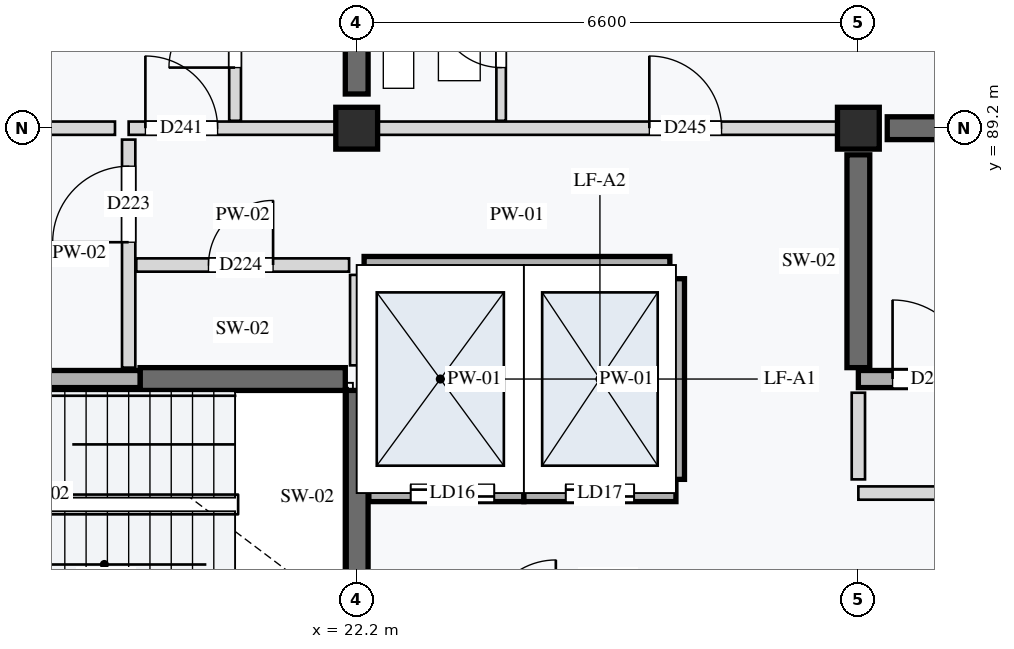
"""IFC4 building model, lengths in metres.
Left out: names, types, materials, properties, quantities, classifications, styles, units other than length and angle.
Written with IfcOpenShell. Run it as: python <this file> out.ifc"""

import sys

from ifc_helpers import new_model, si_unit, direction, frame, frame_2d, origin, origin_2d, place, context, subcontext, project, spatial, rectangle, extrude, element, fill, save


model = new_model("IFC4")
c1 = context("Model", 3, precision=1e-05, world=origin(), true_north=direction((0.0, 1.0)))
c2 = subcontext(c1, "Body", "Model", "MODEL_VIEW")
j1 = project(units=[si_unit("LENGTHUNIT", "METRE"), si_unit("PLANEANGLEUNIT", "RADIAN")], contexts=[c1])
p1 = place(None, origin())
s1 = spatial("IfcSite", under=j1, at=p1, CompositionType="ELEMENT")
p2 = place(p1, origin())
s2 = spatial("IfcBuilding", under=s1, at=p2, CompositionType="ELEMENT")
p3 = place(p2, frame((0.0, 0.0, 24.4)))
s3 = spatial("IfcBuildingStorey", under=s2, at=p3, CompositionType="ELEMENT", Elevation=24.4)
for number, where, z_axis, x_axis in (
    (1, (22.2, 89.2, 0.0), (0.0, 0.0, 1.0), (1.0, 0.0, 0.0)),
    (2, (28.8, 89.2, 0.0), (0.0, 0.0, 1.0), (1.0, 0.0, 0.0)),
):
    element("IfcColumn", number, at=place(p3, frame(where, z_axis=z_axis, x_axis=x_axis)), inside=s3, PredefinedType="COLUMN", context=c2, shape_type="SweptSolid", body=[
        extrude(rectangle(XDim=0.55, YDim=0.55, at=origin_2d()), origin(), (0.0, 0.0, 1.0), 3.2),
    ])
p4 = place(p3, frame((19.35, 85.9, 0.0), z_axis=(0.0, 0.0, 1.0), x_axis=(1.0, 0.0, 0.0)))
e3 = element("IfcWall", 3, at=p4, inside=s3, PredefinedType="SHEAR", context=c2, shape_type="SweptSolid", body=[
    extrude(rectangle(XDim=2.7, YDim=0.3, at=frame_2d((1.35, 0.0))), origin(), (0.0, 0.0, 1.0), 2.97),
])
p5 = place(p3, frame((22.2, 82.95, 0.0), z_axis=(0.0, 0.0, 1.0), x_axis=(0.0, 1.0, 0.0)))
e4 = element("IfcWall", 4, at=p5, inside=s3, PredefinedType="SHEAR", context=c2, shape_type="SweptSolid", body=[
    extrude(rectangle(XDim=2.8, YDim=0.3, at=frame_2d((1.4, 0.0))), origin(), (0.0, 0.0, 1.0), 2.97),
])
p6 = place(p3, frame((29.18, 89.2, 0.0), z_axis=(0.0, 0.0, 1.0), x_axis=(1.0, 0.0, 0.0)))
e5 = element("IfcWall", 5, at=p6, inside=s3, PredefinedType="SHEAR", context=c2, shape_type="SweptSolid", body=[
    extrude(rectangle(XDim=5.84, YDim=0.3, at=frame_2d((2.92, 0.0))), origin(), (0.0, 0.0, 1.0), 2.97),
])
p7 = place(p3, frame((28.8, 86.05, 0.0), z_axis=(0.0, 0.0, 1.0), x_axis=(0.0, 1.0, 0.0)))
e6 = element("IfcWall", 6, at=p7, inside=s3, PredefinedType="SHEAR", context=c2, shape_type="SweptSolid", body=[
    extrude(rectangle(XDim=2.8, YDim=0.3, at=frame_2d((1.4, 0.0))), origin(), (0.0, 0.0, 1.0), 2.97),
])
p8 = place(p3, frame((22.2, 89.65, 0.0), z_axis=(0.0, 0.0, 1.0), x_axis=(0.0, 1.0, 0.0)))
e7 = element("IfcWall", 7, at=p8, inside=s3, PredefinedType="SHEAR", context=c2, shape_type="SweptSolid", body=[
    extrude(rectangle(XDim=5.7, YDim=0.3, at=frame_2d((2.85, 0.0))), origin(), (0.0, 0.0, 1.0), 2.97),
])
p9 = place(p3, frame((15.75, 85.9, 0.0), z_axis=(0.0, 0.0, 1.0), x_axis=(1.0, 0.0, 0.0)))
e8 = element("IfcWall", 8, at=p9, inside=s3, PredefinedType="STANDARD", context=c2, shape_type="SweptSolid", body=[
    extrude(rectangle(XDim=3.6, YDim=0.225, at=frame_2d((1.8, 0.0))), origin(), (0.0, 0.0, 1.0), 2.97),
])
p10 = place(p9, frame((0.45, 0.0, 0.0)))
e9 = element("IfcOpeningElement", 9, at=p10, cuts=e8, PredefinedType="OPENING", context=c2, shape_type="SweptSolid", body=[
    extrude(rectangle(XDim=1.0, YDim=2.1, at=frame_2d((0.5, 1.05))), frame((0.0, 0.123, 0.0), z_axis=(0.0, -1.0, 0.0), x_axis=(1.0, 0.0, 0.0)), (0.0, 0.0, 1.0), 0.245),
])
p11 = place(p3, frame((19.2, 86.05, 0.0), z_axis=(0.0, 0.0, 1.0), x_axis=(0.0, 1.0, 0.0)))
e10 = element("IfcWall", 10, at=p11, inside=s3, PredefinedType="PARTITIONING", context=c2, shape_type="SweptSolid", body=[
    extrude(rectangle(XDim=3.0, YDim=0.175, at=frame_2d((1.5, 0.0))), origin(), (0.0, 0.0, 1.0), 2.97),
])
p12 = place(p11, frame((1.65, 0.0, 0.0)))
e11 = element("IfcOpeningElement", 11, at=p12, cuts=e10, PredefinedType="OPENING", context=c2, shape_type="SweptSolid", body=[
    extrude(rectangle(XDim=1.0, YDim=2.16, at=frame_2d((0.5, 1.08))), frame((0.0, 0.097, 0.0), z_axis=(0.0, -1.0, 0.0), x_axis=(1.0, 0.0, 0.0)), (0.0, 0.0, 1.0), 0.195),
])
p13 = place(p3, frame((19.3, 87.4, 0.0), z_axis=(0.0, 0.0, 1.0), x_axis=(1.0, 0.0, 0.0)))
e12 = element("IfcWall", 12, at=p13, inside=s3, PredefinedType="PARTITIONING", context=c2, shape_type="SweptSolid", body=[
    extrude(rectangle(XDim=2.8, YDim=0.175, at=frame_2d((1.4, 0.0))), origin(), (0.0, 0.0, 1.0), 2.97),
])
p14 = place(p13, frame((0.95, 0.0, 0.0)))
e13 = element("IfcOpeningElement", 13, at=p14, cuts=e12, PredefinedType="OPENING", context=c2, shape_type="SweptSolid", body=[
    extrude(rectangle(XDim=0.85, YDim=2.0, at=frame_2d((0.425, 1.0))), frame((0.0, 0.097, 0.0), z_axis=(0.0, -1.0, 0.0), x_axis=(1.0, 0.0, 0.0)), (0.0, 0.0, 1.0), 0.195),
])
p15 = place(p3, frame((22.2, 86.08, 0.0), z_axis=(0.0, 0.0, 1.0), x_axis=(0.0, 1.0, 0.0)))
e14 = element("IfcWall", 14, at=p15, inside=s3, PredefinedType="PARTITIONING", context=c2, shape_type="SweptSolid", body=[
    extrude(rectangle(XDim=1.19, YDim=0.175, at=frame_2d((0.595, 0.0))), origin(), (0.0, 0.0, 1.0), 2.97),
])
p16 = place(p3, frame((22.36, 84.4, 0.0), z_axis=(0.0, 0.0, 1.0), x_axis=(1.0, 0.0, 0.0)))
e15 = element("IfcWall", 15, at=p16, inside=s3, PredefinedType="STANDARD", context=c2, shape_type="SweptSolid", body=[
    extrude(rectangle(XDim=2.04, YDim=0.225, at=frame_2d((1.02, 0.0))), origin(), (0.0, 0.0, 1.0), 2.97),
])
p17 = place(p16, frame((0.55, 0.0, 0.0)))
e16 = element("IfcOpeningElement", 16, at=p17, cuts=e15, PredefinedType="OPENING", context=c2, shape_type="SweptSolid", body=[
    extrude(rectangle(XDim=1.1, YDim=2.1, at=frame_2d((0.55, 1.05))), frame((0.0, 0.123, 0.0), z_axis=(0.0, -1.0, 0.0), x_axis=(1.0, 0.0, 0.0)), (0.0, 0.0, 1.0), 0.245),
])
p18 = place(p3, frame((24.4, 84.4, 0.0), z_axis=(0.0, 0.0, 1.0), x_axis=(1.0, 0.0, 0.0)))
e17 = element("IfcWall", 17, at=p18, inside=s3, PredefinedType="STANDARD", context=c2, shape_type="SweptSolid", body=[
    extrude(rectangle(XDim=2.0, YDim=0.225, at=frame_2d((1.0, 0.0))), origin(), (0.0, 0.0, 1.0), 2.97),
])
p19 = place(p18, frame((0.55, 0.0, 0.0)))
e18 = element("IfcOpeningElement", 18, at=p19, cuts=e17, PredefinedType="OPENING", context=c2, shape_type="SweptSolid", body=[
    extrude(rectangle(XDim=0.9, YDim=2.1, at=frame_2d((0.45, 1.05))), frame((0.0, 0.123, 0.0), z_axis=(0.0, -1.0, 0.0), x_axis=(1.0, 0.0, 0.0)), (0.0, 0.0, 1.0), 0.245),
])
p20 = place(p3, frame((22.298, 87.4, 0.0), z_axis=(0.0, 0.0, 1.0), x_axis=(1.0, 0.0, 0.0)))
e19 = element("IfcWall", 19, at=p20, inside=s3, PredefinedType="STANDARD", context=c2, shape_type="SweptSolid", body=[
    extrude(rectangle(XDim=4.022, YDim=0.225, at=frame_2d((2.011, 0.0))), origin(), (0.0, 0.0, 1.0), 2.97),
])
for number, where, z_axis, x_axis in (
    (20, (24.4, 84.58, 0.0), (0.0, 0.0, 1.0), (0.0, 1.0, 0.0)),
    (21, (26.4, 84.58, 0.0), (0.0, 0.0, 1.0), (0.0, 1.0, 0.0)),
):
    element("IfcWall", number, at=place(p3, frame(where, z_axis=z_axis, x_axis=x_axis)), inside=s3, PredefinedType="STANDARD", context=c2, shape_type="SweptSolid", body=[
        extrude(rectangle(XDim=2.64, YDim=0.225, at=frame_2d((1.32, 0.0))), origin(), (0.0, 0.0, 1.0), 2.97),
    ])
p21 = place(p3, frame((28.8, 85.9, 0.0), z_axis=(0.0, 0.0, 1.0), x_axis=(1.0, 0.0, 0.0)))
e22 = element("IfcWall", 22, at=p21, inside=s3, PredefinedType="STANDARD", context=c2, shape_type="SweptSolid", body=[
    extrude(rectangle(XDim=3.45, YDim=0.225, at=frame_2d((1.725, 0.0))), origin(), (0.0, 0.0, 1.0), 2.97),
])
p22 = place(p21, frame((0.45, 0.0, 0.0)))
e23 = element("IfcOpeningElement", 23, at=p22, cuts=e22, PredefinedType="OPENING", context=c2, shape_type="SweptSolid", body=[
    extrude(rectangle(XDim=1.04, YDim=2.12, at=frame_2d((0.52, 1.06))), frame((0.0, 0.123, 0.0), z_axis=(0.0, -1.0, 0.0), x_axis=(1.0, 0.0, 0.0)), (0.0, 0.0, 1.0), 0.245),
])
p23 = place(p3, frame((28.8, 84.4, 0.0), z_axis=(0.0, 0.0, 1.0), x_axis=(1.0, 0.0, 0.0)))
e24 = element("IfcWall", 24, at=p23, inside=s3, PredefinedType="PARTITIONING", context=c2, shape_type="SweptSolid", body=[
    extrude(rectangle(XDim=3.3, YDim=0.175, at=frame_2d((1.65, 0.0))), origin(), (0.0, 0.0, 1.0), 2.97),
])
p24 = place(p23, frame((1.8, 0.0, 0.0)))
e25 = element("IfcOpeningElement", 25, at=p24, cuts=e24, PredefinedType="OPENING", context=c2, shape_type="SweptSolid", body=[
    extrude(rectangle(XDim=1.0, YDim=2.1, at=frame_2d((0.5, 1.05))), frame((0.0, 0.097, 0.0), z_axis=(0.0, -1.0, 0.0), x_axis=(1.0, 0.0, 0.0)), (0.0, 0.0, 1.0), 0.195),
])
p25 = place(p3, frame((28.8, 84.58, 0.0), z_axis=(0.0, 0.0, 1.0), x_axis=(0.0, 1.0, 0.0)))
e26 = element("IfcWall", 26, at=p25, inside=s3, PredefinedType="PARTITIONING", context=c2, shape_type="SweptSolid", body=[
    extrude(rectangle(XDim=1.14, YDim=0.175, at=frame_2d((0.57, 0.0))), origin(), (0.0, 0.0, 1.0), 2.97),
])
p26 = place(p3, frame((15.88, 89.2, 0.0), z_axis=(0.0, 0.0, 1.0), x_axis=(1.0, 0.0, 0.0)))
e27 = element("IfcWall", 27, at=p26, inside=s3, PredefinedType="PARTITIONING", context=c2, shape_type="SweptSolid", body=[
    extrude(rectangle(XDim=3.14, YDim=0.175, at=frame_2d((1.57, 0.0))), origin(), (0.0, 0.0, 1.0), 2.7),
])
p27 = place(p3, frame((19.2, 89.2, 0.0), z_axis=(0.0, 0.0, 1.0), x_axis=(1.0, 0.0, 0.0)))
e28 = element("IfcWall", 28, at=p27, inside=s3, PredefinedType="PARTITIONING", context=c2, shape_type="SweptSolid", body=[
    extrude(rectangle(XDim=3.0, YDim=0.175, at=frame_2d((1.5, 0.0))), origin(), (0.0, 0.0, 1.0), 2.7),
])
p28 = place(p27, frame((0.22, 0.0, 0.0)))
e29 = element("IfcOpeningElement", 29, at=p28, cuts=e28, PredefinedType="OPENING", context=c2, shape_type="SweptSolid", body=[
    extrude(rectangle(XDim=0.95, YDim=2.16, at=frame_2d((0.475, 1.08))), frame((0.0, 0.097, 0.0), z_axis=(0.0, -1.0, 0.0), x_axis=(1.0, 0.0, 0.0)), (0.0, 0.0, 1.0), 0.195),
])
p29 = place(p3, frame((20.6, 89.298, 0.0), z_axis=(0.0, 0.0, 1.0), x_axis=(0.0, 1.0, 0.0)))
e30 = element("IfcWall", 30, at=p29, inside=s3, PredefinedType="PARTITIONING", context=c2, shape_type="SweptSolid", body=[
    extrude(rectangle(XDim=2.302, YDim=0.155, at=frame_2d((1.151, 0.0))), origin(), (0.0, 0.0, 1.0), 2.97),
])
p30 = place(p29, frame((0.7, 0.0, 0.0)))
e31 = element("IfcOpeningElement", 31, at=p30, cuts=e30, PredefinedType="OPENING", context=c2, shape_type="SweptSolid", body=[
    extrude(rectangle(XDim=0.87, YDim=2.08, at=frame_2d((0.435, 1.04))), frame((0.0, 0.087, 0.0), z_axis=(0.0, -1.0, 0.0), x_axis=(1.0, 0.0, 0.0)), (0.0, 0.0, 1.0), 0.175),
])
p31 = place(p3, frame((22.2, 89.2, 0.0), z_axis=(0.0, 0.0, 1.0), x_axis=(1.0, 0.0, 0.0)))
e32 = element("IfcWall", 32, at=p31, inside=s3, PredefinedType="PARTITIONING", context=c2, shape_type="SweptSolid", body=[
    extrude(rectangle(XDim=6.6, YDim=0.175, at=frame_2d((3.3, 0.0))), origin(), (0.0, 0.0, 1.0), 2.7),
])
p32 = place(p31, frame((3.85, 0.0, 0.0)))
e33 = element("IfcOpeningElement", 33, at=p32, cuts=e32, PredefinedType="OPENING", context=c2, shape_type="SweptSolid", body=[
    extrude(rectangle(XDim=0.95, YDim=2.16, at=frame_2d((0.475, 1.08))), frame((0.0, 0.097, 0.0), z_axis=(0.0, -1.0, 0.0), x_axis=(1.0, 0.0, 0.0)), (0.0, 0.0, 1.0), 0.195),
])
p33 = place(p3, frame((24.1, 89.298, 0.0), z_axis=(0.0, 0.0, 1.0), x_axis=(0.0, 1.0, 0.0)))
e34 = element("IfcWall", 34, at=p33, inside=s3, PredefinedType="PARTITIONING", context=c2, shape_type="SweptSolid", body=[
    extrude(rectangle(XDim=2.302, YDim=0.125, at=frame_2d((1.151, 0.0))), origin(), (0.0, 0.0, 1.0), 2.97),
])
p34 = place(p33, frame((0.7, 0.0, 0.0)))
e35 = element("IfcOpeningElement", 35, at=p34, cuts=e34, PredefinedType="OPENING", context=c2, shape_type="SweptSolid", body=[
    extrude(rectangle(XDim=0.84, YDim=2.06, at=frame_2d((0.42, 1.03))), frame((0.0, 0.073, 0.0), z_axis=(0.0, -1.0, 0.0), x_axis=(1.0, 0.0, 0.0)), (0.0, 0.0, 1.0), 0.145),
])
p35 = place(p12, origin())
e36 = element("IfcDoor", 36, at=p35, inside=s3, OperationType="SINGLE_SWING_LEFT", PredefinedType="DOOR", context=c2, shape_type="SweptSolid", body=[
    extrude(rectangle(XDim=1.0, YDim=2.16, at=frame_2d((0.5, 1.08))), frame((0.0, 0.025, 0.0), z_axis=(0.0, -1.0, 0.0), x_axis=(1.0, 0.0, 0.0)), (0.0, 0.0, 1.0), 0.05),
])
fill(e11, e36)
p36 = place(p14, origin())
e37 = element("IfcDoor", 37, at=p36, inside=s3, OperationType="SINGLE_SWING_RIGHT", PredefinedType="DOOR", context=c2, shape_type="SweptSolid", body=[
    extrude(rectangle(XDim=0.85, YDim=2.0, at=frame_2d((0.425, 1.0))), frame((0.0, 0.025, 0.0), z_axis=(0.0, -1.0, 0.0), x_axis=(1.0, 0.0, 0.0)), (0.0, 0.0, 1.0), 0.05),
])
fill(e13, e37)
p37 = place(p17, origin())
e38 = element("IfcDoor", 38, at=p37, inside=s3, OperationType="DOUBLE_DOOR_SLIDING", PredefinedType="DOOR", context=c2, shape_type="SweptSolid", body=[
    extrude(rectangle(XDim=1.1, YDim=2.1, at=frame_2d((0.55, 1.05))), frame((0.0, 0.025, 0.0), z_axis=(0.0, -1.0, 0.0), x_axis=(1.0, 0.0, 0.0)), (0.0, 0.0, 1.0), 0.05),
])
fill(e16, e38)
p38 = place(p19, origin())
e39 = element("IfcDoor", 39, at=p38, inside=s3, OperationType="DOUBLE_DOOR_SLIDING", PredefinedType="DOOR", context=c2, shape_type="SweptSolid", body=[
    extrude(rectangle(XDim=0.9, YDim=2.1, at=frame_2d((0.45, 1.05))), frame((0.0, 0.025, 0.0), z_axis=(0.0, -1.0, 0.0), x_axis=(1.0, 0.0, 0.0)), (0.0, 0.0, 1.0), 0.05),
])
fill(e18, e39)
p39 = place(p22, origin())
e40 = element("IfcDoor", 40, at=p39, inside=s3, OperationType="SINGLE_SWING_LEFT", PredefinedType="DOOR", context=c2, shape_type="SweptSolid", body=[
    extrude(rectangle(XDim=1.04, YDim=2.12, at=frame_2d((0.52, 1.06))), frame((0.0, 0.025, 0.0), z_axis=(0.0, -1.0, 0.0), x_axis=(1.0, 0.0, 0.0)), (0.0, 0.0, 1.0), 0.05),
])
fill(e23, e40)
p40 = place(p28, origin())
e41 = element("IfcDoor", 41, at=p40, inside=s3, OperationType="SINGLE_SWING_LEFT", PredefinedType="DOOR", context=c2, shape_type="SweptSolid", body=[
    extrude(rectangle(XDim=0.95, YDim=2.16, at=frame_2d((0.475, 1.08))), frame((0.0, 0.025, 0.0), z_axis=(0.0, -1.0, 0.0), x_axis=(1.0, 0.0, 0.0)), (0.0, 0.0, 1.0), 0.05),
])
fill(e29, e41)
p41 = place(p30, origin())
e42 = element("IfcDoor", 42, at=p41, inside=s3, OperationType="SINGLE_SWING_LEFT", PredefinedType="DOOR", context=c2, shape_type="SweptSolid", body=[
    extrude(rectangle(XDim=0.87, YDim=2.08, at=frame_2d((0.435, 1.04))), frame((0.0, 0.025, 0.0), z_axis=(0.0, -1.0, 0.0), x_axis=(1.0, 0.0, 0.0)), (0.0, 0.0, 1.0), 0.05),
])
fill(e31, e42)
p42 = place(p32, origin())
e43 = element("IfcDoor", 43, at=p42, inside=s3, OperationType="SINGLE_SWING_LEFT", PredefinedType="DOOR", context=c2, shape_type="SweptSolid", body=[
    extrude(rectangle(XDim=0.95, YDim=2.16, at=frame_2d((0.475, 1.08))), frame((0.0, 0.025, 0.0), z_axis=(0.0, -1.0, 0.0), x_axis=(1.0, 0.0, 0.0)), (0.0, 0.0, 1.0), 0.05),
])
fill(e33, e43)
p43 = place(p34, origin())
e44 = element("IfcDoor", 44, at=p43, inside=s3, OperationType="SINGLE_SWING_RIGHT", PredefinedType="DOOR", context=c2, shape_type="SweptSolid", body=[
    extrude(rectangle(XDim=0.84, YDim=2.06, at=frame_2d((0.42, 1.03))), frame((0.0, 0.025, 0.0), z_axis=(0.0, -1.0, 0.0), x_axis=(1.0, 0.0, 0.0)), (0.0, 0.0, 1.0), 0.05),
])
fill(e35, e44)
save(model, sys.argv[1])
